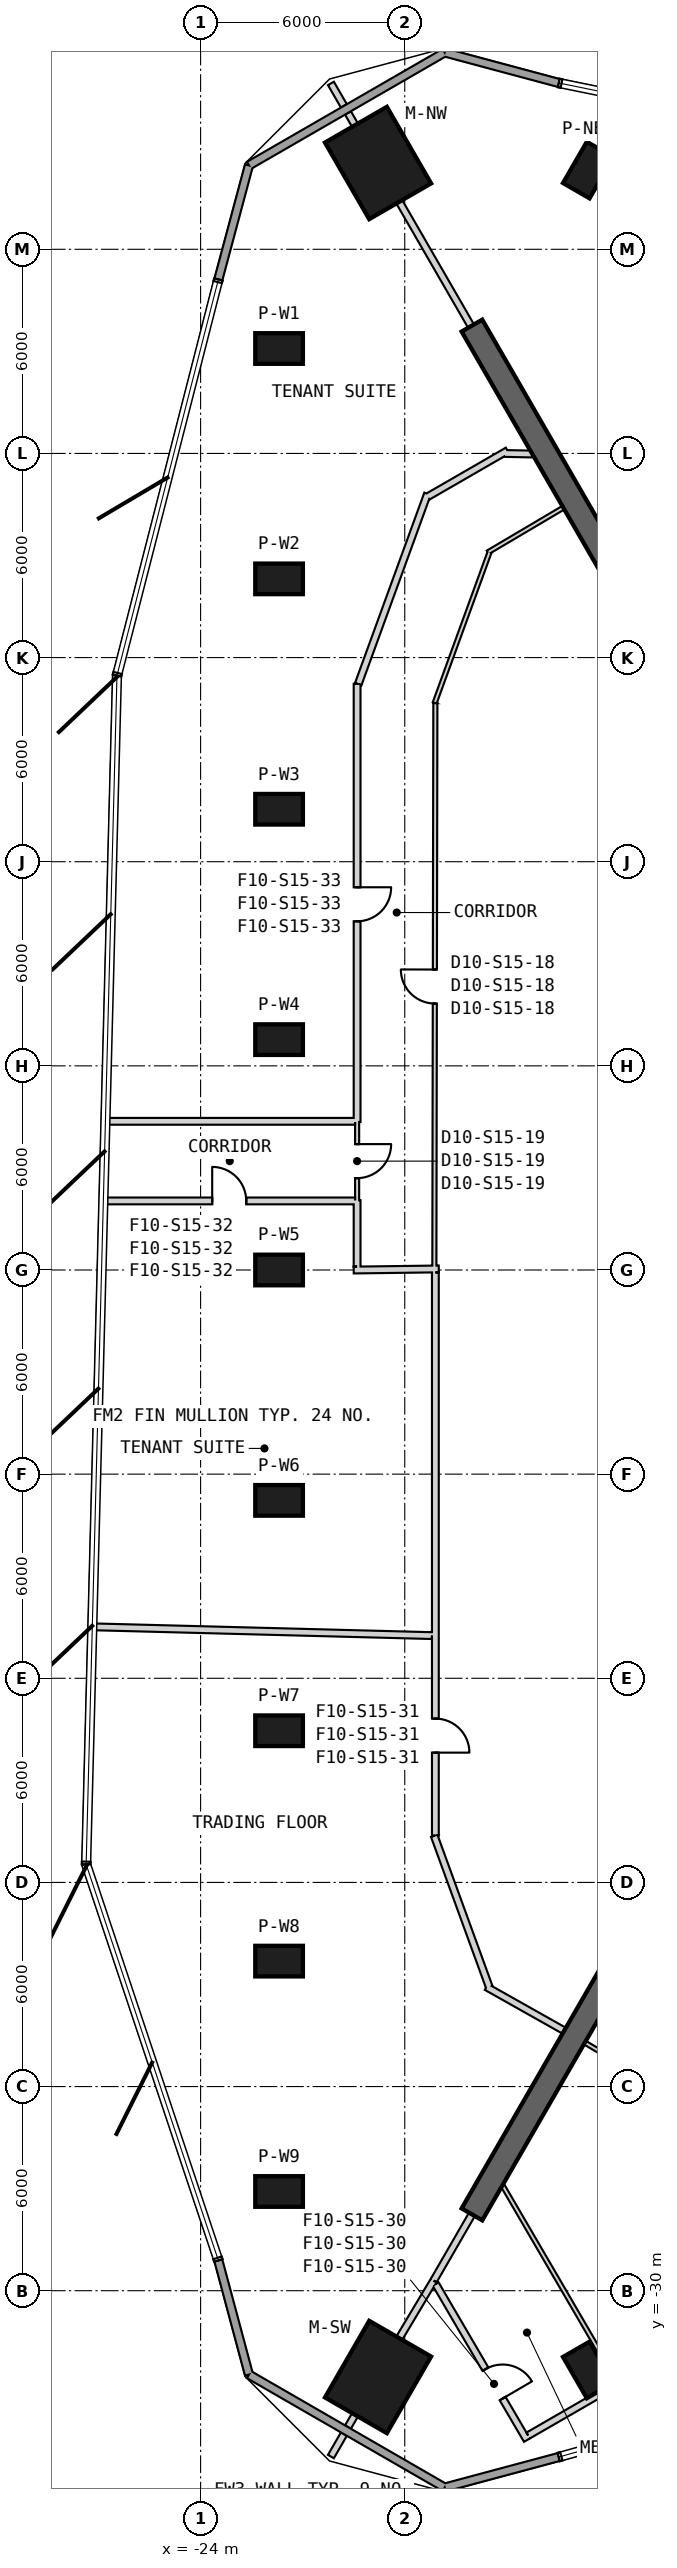
"""IFC4 building model, lengths in metres.
Left out: names, types, materials, properties, quantities, classifications, styles, units other than length and angle.
Written with IfcOpenShell. Run it as: python <this file> out.ifc"""

import sys

from ifc_helpers import new_model, si_unit, direction, frame, frame_2d, origin, origin_2d, place, context, subcontext, project, spatial, rectangle, extrude, element, fill, save


model = new_model("IFC4")
c1 = context("Model", 3, precision=1e-05, world=origin(), true_north=direction((0.0, 1.0)))
c2 = subcontext(c1, "Body", "Model", "MODEL_VIEW")
j1 = project(units=[si_unit("LENGTHUNIT", "METRE"), si_unit("PLANEANGLEUNIT", "RADIAN")], contexts=[c1])
p1 = place(None, origin())
s1 = spatial("IfcSite", under=j1, at=p1, CompositionType="ELEMENT")
p2 = place(p1, origin())
s2 = spatial("IfcBuilding", under=s1, at=p2, CompositionType="ELEMENT")
p3 = place(p2, frame((0.0, 0.0, 241.2)))
s3 = spatial("IfcBuildingStorey", under=s2, at=p3, CompositionType="ELEMENT", Elevation=241.2)
for number, where, z_axis, x_axis in (
    (1, (-18.785, 32.536, 0.0), (0.0, 0.0, 1.0), (-0.5, 0.866, 0.0)),
    (2, (-18.785, -32.536, 0.0), (0.0, 0.0, 1.0), (-0.5, -0.866, 0.0)),
):
    element("IfcColumn", number, at=place(p3, frame(where, z_axis=z_axis, x_axis=x_axis)), inside=s3, PredefinedType="COLUMN", context=c2, shape_type="SweptSolid", body=[
        extrude(rectangle(XDim=2.6, YDim=2.1, at=origin_2d()), origin(), (0.0, 0.0, 1.0), 4.0),
    ])
for number, where, z_axis, x_axis in (
    (3, (-21.693, 27.084, 0.0), (0.0, 0.0, 1.0), (-1.0, 0.0, 0.0)),
    (4, (-21.693, 20.313, 0.0), (0.0, 0.0, 1.0), (-1.0, 0.0, 0.0)),
    (5, (-21.693, 13.542, 0.0), (0.0, 0.0, 1.0), (-1.0, 0.0, 0.0)),
    (6, (-21.693, 6.771, 0.0), (0.0, 0.0, 1.0), (-1.0, 0.0, 0.0)),
    (7, (-21.693, 0.0, 0.0), (0.0, 0.0, 1.0), (-1.0, 0.0, 0.0)),
    (8, (-21.693, -6.771, 0.0), (0.0, 0.0, 1.0), (-1.0, 0.0, 0.0)),
    (9, (-21.693, -13.542, 0.0), (0.0, 0.0, 1.0), (-1.0, 0.0, 0.0)),
    (10, (-21.693, -20.313, 0.0), (0.0, 0.0, 1.0), (-1.0, 0.0, 0.0)),
    (11, (-21.693, -27.084, 0.0), (0.0, 0.0, 1.0), (-1.0, 0.0, 0.0)),
    (12, (-12.609, 32.329, 0.0), (0.0, 0.0, 1.0), (0.5, 0.866, 0.0)),
    (13, (-12.609, -32.329, 0.0), (0.0, 0.0, 1.0), (0.5, -0.866, 0.0)),
):
    element("IfcColumn", number, at=place(p3, frame(where, z_axis=z_axis, x_axis=x_axis)), inside=s3, PredefinedType="COLUMN", context=c2, shape_type="SweptSolid", body=[
        extrude(rectangle(XDim=1.4, YDim=0.9, at=origin_2d()), origin(), (0.0, 0.0, 1.0), 4.0),
    ])
for number, where, z_axis, x_axis in (
    (14, (-10.575, 18.316, 0.0), (0.0, 0.0, 1.0), (-0.5, 0.866, 0.0)),
    (15, (-10.575, -18.316, 0.0), (0.0, 0.0, 1.0), (-0.5, -0.866, 0.0)),
):
    element("IfcWall", number, at=place(p3, frame(where, z_axis=z_axis, x_axis=x_axis)), inside=s3, PredefinedType="SHEAR", context=c2, shape_type="SweptSolid", body=[
        extrude(rectangle(XDim=10.9, YDim=0.7, at=frame_2d((5.45, 0.0))), origin(), (0.0, 0.0, 1.0), 4.0),
    ])
p4 = place(p3, frame((-13.471, 34.888, 0.0), z_axis=(0.0, 0.0, 1.0), x_axis=(-0.965929859648, 0.258803991931, 0.0)))
e16 = element("IfcWall", 16, at=p4, inside=s3, PredefinedType="SOLIDWALL", context=c2, shape_type="SweptSolid", body=[
    extrude(rectangle(XDim=3.474, YDim=0.24, at=frame_2d((1.737, 0.0))), origin(), (0.0, 0.0, 1.0), 3.7),
])
p5 = place(p3, frame((-16.827, 35.787, 0.0), z_axis=(0.0, 0.0, 1.0), x_axis=(-0.866017876419, -0.500013037552, 0.0)))
e17 = element("IfcWall", 17, at=p5, inside=s3, PredefinedType="SOLIDWALL", context=c2, shape_type="SweptSolid", body=[
    extrude(rectangle(XDim=6.642, YDim=0.24, at=frame_2d((3.321, 0.0))), origin(), (0.0, 0.0, 1.0), 3.7),
])
p6 = place(p3, frame((-22.579, 32.466, 0.0), z_axis=(0.0, 0.0, 1.0), x_axis=(-0.25885800589, -0.965915385935, 0.0)))
e18 = element("IfcWall", 18, at=p6, inside=s3, PredefinedType="SOLIDWALL", context=c2, shape_type="SweptSolid", body=[
    extrude(rectangle(XDim=3.47, YDim=0.24, at=frame_2d((1.735, 0.0))), origin(), (0.0, 0.0, 1.0), 3.7),
])
p7 = place(p3, frame((-23.478, -29.11, 0.0), z_axis=(0.0, 0.0, 1.0), x_axis=(0.258821559604, -0.965925152527, 0.0)))
e19 = element("IfcWall", 19, at=p7, inside=s3, PredefinedType="SOLIDWALL", context=c2, shape_type="SweptSolid", body=[
    extrude(rectangle(XDim=3.474, YDim=0.24, at=frame_2d((1.737, 0.0))), origin(), (0.0, 0.0, 1.0), 3.7),
])
p8 = place(p3, frame((-22.579, -32.466, 0.0), z_axis=(0.0, 0.0, 1.0), x_axis=(0.866017876419, -0.500013037552, 0.0)))
e20 = element("IfcWall", 20, at=p8, inside=s3, PredefinedType="SOLIDWALL", context=c2, shape_type="SweptSolid", body=[
    extrude(rectangle(XDim=6.642, YDim=0.24, at=frame_2d((3.321, 0.0))), origin(), (0.0, 0.0, 1.0), 3.7),
])
p9 = place(p3, frame((-16.827, -35.787, 0.0), z_axis=(0.0, 0.0, 1.0), x_axis=(0.96593768865, 0.258774770111, 0.0)))
e21 = element("IfcWall", 21, at=p9, inside=s3, PredefinedType="SOLIDWALL", context=c2, shape_type="SweptSolid", body=[
    extrude(rectangle(XDim=3.47, YDim=0.24, at=frame_2d((1.735, 0.0))), origin(), (0.0, 0.0, 1.0), 3.7),
])
p10 = place(p3, frame((-13.339, 22.405, 0.0), z_axis=(0.0, 0.0, 1.0), x_axis=(-0.86070028932, -0.509111983718, 0.0)))
e22 = element("IfcWall", 22, at=p10, inside=s3, PredefinedType="PARTITIONING", context=c2, shape_type="SweptSolid", body=[
    extrude(rectangle(XDim=2.579, YDim=0.12, at=frame_2d((1.29, 0.0))), origin(), (0.0, 0.0, 1.0), 3.7),
])
p11 = place(p3, frame((-15.506, 21.103, 0.0), z_axis=(0.0, 0.0, 1.0), x_axis=(-0.342017079535, -0.939693735909, 0.0)))
e23 = element("IfcWall", 23, at=p11, inside=s3, PredefinedType="PARTITIONING", context=c2, shape_type="SweptSolid", body=[
    extrude(rectangle(XDim=4.721, YDim=0.12, at=frame_2d((2.361, 0.0))), origin(), (0.0, 0.0, 1.0), 2.88),
])
p12 = place(p3, frame((-17.13, 0.0, 0.0), z_axis=(0.0, 0.0, 1.0), x_axis=(0.001787542932, 0.999998402344, 0.0)))
e24 = element("IfcWall", 24, at=p12, inside=s3, PredefinedType="PARTITIONING", context=c2, shape_type="SweptSolid", body=[
    extrude(rectangle(XDim=16.663, YDim=0.12, at=frame_2d((8.331, 0.0))), origin(), (0.0, 0.0, 1.0), 2.98),
])
p13 = place(p12, frame((7.831, 0.0, 0.0)))
e25 = element("IfcOpeningElement", 25, at=p13, cuts=e24, PredefinedType="OPENING", context=c2, shape_type="SweptSolid", body=[
    extrude(rectangle(XDim=1.0, YDim=2.1, at=frame_2d((0.5, 1.05))), frame((0.0, 0.07, 0.0), z_axis=(0.0, -1.0, 0.0), x_axis=(1.0, 0.0, 0.0)), (0.0, 0.0, 1.0), 0.14),
])
p14 = place(p3, frame((-19.4, 4.35, 0.0), z_axis=(0.0, 0.0, 1.0), x_axis=(0.0, -1.0, 0.0)))
e26 = element("IfcWall", 26, at=p14, inside=s3, PredefinedType="PARTITIONING", context=c2, shape_type="SweptSolid", body=[
    extrude(rectangle(XDim=2.3, YDim=0.12, at=frame_2d((1.15, 0.0))), origin(), (0.0, 0.0, 1.0), 3.7),
])
p15 = place(p14, frame((0.65, 0.0, 0.0)))
e27 = element("IfcOpeningElement", 27, at=p15, cuts=e26, PredefinedType="OPENING", context=c2, shape_type="SweptSolid", body=[
    extrude(rectangle(XDim=1.0, YDim=2.1, at=frame_2d((0.5, 1.05))), frame((0.0, 0.07, 0.0), z_axis=(0.0, -1.0, 0.0), x_axis=(1.0, 0.0, 0.0)), (0.0, 0.0, 1.0), 0.14),
])
p16 = place(p3, frame((-19.5, -0.001, 0.0), z_axis=(0.0, 0.0, 1.0), x_axis=(0.999915662945, 0.012987185857, 0.0)))
e28 = element("IfcWall", 28, at=p16, inside=s3, PredefinedType="PARTITIONING", context=c2, shape_type="SweptSolid", body=[
    extrude(rectangle(XDim=2.5, YDim=0.2, at=frame_2d((1.25, 0.0))), origin(), (0.0, 0.0, 1.0), 3.07),
])
p17 = place(p3, frame((-19.4, 17.228, 0.0), z_axis=(0.0, 0.0, 1.0), x_axis=(0.0, -1.0, 0.0)))
e29 = element("IfcWall", 29, at=p17, inside=s3, PredefinedType="PARTITIONING", context=c2, shape_type="SweptSolid", body=[
    extrude(rectangle(XDim=12.878, YDim=0.2, at=frame_2d((6.439, 0.0))), origin(), (0.0, 0.0, 1.0), 2.98),
])
p18 = place(p17, frame((5.979, 0.0, 0.0)))
e30 = element("IfcOpeningElement", 30, at=p18, cuts=e29, PredefinedType="OPENING", context=c2, shape_type="SweptSolid", body=[
    extrude(rectangle(XDim=1.0, YDim=2.1, at=frame_2d((0.5, 1.05))), frame((0.0, 0.11, 0.0), z_axis=(0.0, -1.0, 0.0), x_axis=(1.0, 0.0, 0.0)), (0.0, 0.0, 1.0), 0.22),
])
p19 = place(p3, frame((-19.4, 2.05, 0.0), z_axis=(0.0, 0.0, 1.0), x_axis=(0.0, -1.0, 0.0)))
e31 = element("IfcWall", 31, at=p19, inside=s3, PredefinedType="PARTITIONING", context=c2, shape_type="SweptSolid", body=[
    extrude(rectangle(XDim=1.95, YDim=0.2, at=frame_2d((0.975, 0.0))), origin(), (0.0, 0.0, 1.0), 3.07),
])
p20 = place(p3, frame((-17.331, 22.814, 0.0), z_axis=(0.0, 0.0, 1.0), x_axis=(-0.342006584993, -0.939697555505, 0.0)))
e32 = element("IfcWall", 32, at=p20, inside=s3, PredefinedType="PARTITIONING", context=c2, shape_type="SweptSolid", body=[
    extrude(rectangle(XDim=5.951, YDim=0.2, at=frame_2d((2.975, 0.0))), origin(), (0.0, 0.0, 1.0), 2.88),
])
p21 = place(p3, frame((-14.98, 24.083, 0.0), z_axis=(0.0, 0.0, 1.0), x_axis=(-0.866008795918, -0.500028764566, 0.0)))
e33 = element("IfcWall", 33, at=p21, inside=s3, PredefinedType="PARTITIONING", context=c2, shape_type="SweptSolid", body=[
    extrude(rectangle(XDim=2.714, YDim=0.2, at=frame_2d((1.357, 0.0))), origin(), (0.0, 0.0, 1.0), 3.7),
])
p22 = place(p3, frame((-14.25, 23.982, 0.0), z_axis=(0.0, 0.0, 1.0), x_axis=(-0.999799129767, 0.02004245786, 0.0)))
e34 = element("IfcWall", 34, at=p22, inside=s3, PredefinedType="PARTITIONING", context=c2, shape_type="SweptSolid", body=[
    extrude(rectangle(XDim=0.841, YDim=0.2, at=frame_2d((0.42, 0.0))), origin(), (0.0, 0.0, 1.0), 3.7),
])
p23 = place(p3, frame((-15.598, -21.072, 0.0), z_axis=(0.0, 0.0, 1.0), x_axis=(0.871234731294, -0.490866624438, 0.0)))
e35 = element("IfcWall", 35, at=p23, inside=s3, PredefinedType="PARTITIONING", context=c2, shape_type="SweptSolid", body=[
    extrude(rectangle(XDim=2.623, YDim=0.2, at=frame_2d((1.311, 0.0))), origin(), (0.0, 0.0, 1.0), 3.7),
])
p24 = place(p3, frame((-17.134, -16.629, 0.0), z_axis=(0.0, 0.0, 1.0), x_axis=(0.342036655594, -0.939686610647, 0.0)))
e36 = element("IfcWall", 36, at=p24, inside=s3, PredefinedType="PARTITIONING", context=c2, shape_type="SweptSolid", body=[
    extrude(rectangle(XDim=4.74, YDim=0.2, at=frame_2d((2.37, 0.0))), origin(), (0.0, 0.0, 1.0), 2.88),
])
p25 = place(p3, frame((-17.1, -0.07, 0.0), z_axis=(0.0, 0.0, 1.0), x_axis=(0.0, -1.0, 0.0)))
e37 = element("IfcWall", 37, at=p25, inside=s3, PredefinedType="PARTITIONING", context=c2, shape_type="SweptSolid", body=[
    extrude(rectangle(XDim=16.552, YDim=0.2, at=frame_2d((8.276, 0.0))), origin(), (0.0, 0.0, 1.0), 2.98),
])
p26 = place(p25, frame((13.115, 0.0, 0.0)))
e38 = element("IfcOpeningElement", 38, at=p26, cuts=e37, PredefinedType="OPENING", context=c2, shape_type="SweptSolid", body=[
    extrude(rectangle(XDim=1.0, YDim=2.1, at=frame_2d((0.5, 1.05))), frame((0.0, 0.11, 0.0), z_axis=(0.0, -1.0, 0.0), x_axis=(1.0, 0.0, 0.0)), (0.0, 0.0, 1.0), 0.22),
])
p27 = place(p3, frame((-12.707, -22.709, 0.0), z_axis=(0.0, 0.0, 1.0), x_axis=(0.860742216303, -0.509041095663, 0.0)))
e39 = element("IfcWall", 39, at=p27, inside=s3, PredefinedType="PARTITIONING", context=c2, shape_type="SweptSolid", body=[
    extrude(rectangle(XDim=2.506, YDim=0.12, at=frame_2d((1.253, 0.0))), origin(), (0.0, 0.0, 1.0), 3.7),
])
p28 = place(p27, frame((0.803, 0.0, 0.0)))
e40 = element("IfcOpeningElement", 40, at=p28, cuts=e39, PredefinedType="OPENING", context=c2, shape_type="SweptSolid", body=[
    extrude(rectangle(XDim=1.0, YDim=2.1, at=frame_2d((0.5, 1.05))), frame((0.0, 0.07, 0.0), z_axis=(0.0, -1.0, 0.0), x_axis=(1.0, 0.0, 0.0)), (0.0, 0.0, 1.0), 0.14),
])
p29 = place(p3, frame((-26.858, 2.03, 0.0), z_axis=(0.0, 0.0, 1.0), x_axis=(1.0, 0.0, 0.0)))
e41 = element("IfcWall", 41, at=p29, inside=s3, PredefinedType="PARTITIONING", context=c2, shape_type="SweptSolid", body=[
    extrude(rectangle(XDim=7.398, YDim=0.2, at=frame_2d((3.699, 0.0))), origin(), (0.0, 0.0, 1.0), 3.7),
])
p30 = place(p29, frame((3.199, 0.0, 0.0)))
e42 = element("IfcOpeningElement", 42, at=p30, cuts=e41, PredefinedType="OPENING", context=c2, shape_type="SweptSolid", body=[
    extrude(rectangle(XDim=1.0, YDim=2.1, at=frame_2d((0.5, 1.05))), frame((0.0, 0.11, 0.0), z_axis=(0.0, -1.0, 0.0), x_axis=(1.0, 0.0, 0.0)), (0.0, 0.0, 1.0), 0.22),
])
p31 = place(p3, frame((-19.46, 4.37, 0.0), z_axis=(0.0, 0.0, 1.0), x_axis=(-1.0, 0.0, 0.0)))
e43 = element("IfcWall", 43, at=p31, inside=s3, PredefinedType="PARTITIONING", context=c2, shape_type="SweptSolid", body=[
    extrude(rectangle(XDim=7.337, YDim=0.2, at=frame_2d((3.669, 0.0))), origin(), (0.0, 0.0, 1.0), 3.7),
])
p32 = place(p3, frame((-17.2, -10.746, 0.0), z_axis=(0.0, 0.0, 1.0), x_axis=(-0.9996635128, 0.025939567783, 0.0)))
e44 = element("IfcWall", 44, at=p32, inside=s3, PredefinedType="PARTITIONING", context=c2, shape_type="SweptSolid", body=[
    extrude(rectangle(XDim=9.986, YDim=0.2, at=frame_2d((4.993, 0.0))), origin(), (0.0, 0.0, 1.0), 2.98),
])
p33 = place(p3, frame((-20.17, -34.875, 0.0), z_axis=(0.0, 0.0, 1.0), x_axis=(0.499999897272, 0.866025463095, 0.0)))
e45 = element("IfcWall", 45, at=p33, inside=s3, PredefinedType="PARTITIONING", context=c2, shape_type="SweptSolid", body=[
    extrude(rectangle(XDim=0.762, YDim=0.2, at=frame_2d((0.381, 0.0))), origin(), (0.0, 0.0, 1.0), 3.7),
])
p34 = place(p3, frame((-19.669, -34.007, 0.0), z_axis=(0.0, 0.0, 1.0), x_axis=(0.499739399214, 0.866175809448, 0.0)))
e46 = element("IfcWall", 46, at=p34, inside=s3, PredefinedType="PARTITIONING", context=c2, shape_type="SweptSolid", body=[
    extrude(rectangle(XDim=0.416, YDim=0.2, at=frame_2d((0.208, 0.0))), origin(), (0.0, 0.0, 1.0), 3.7),
])
p35 = place(p3, frame((-17.149, -29.702, 0.0), z_axis=(0.0, 0.0, 1.0), x_axis=(0.500042241774, 0.866001014111, 0.0)))
e47 = element("IfcWall", 47, at=p35, inside=s3, PredefinedType="PARTITIONING", context=c2, shape_type="SweptSolid", body=[
    extrude(rectangle(XDim=2.247, YDim=0.2, at=frame_2d((1.124, 0.0))), origin(), (0.0, 0.0, 1.0), 3.27),
])
p36 = place(p3, frame((-18.161, -31.396, 0.0), z_axis=(0.0, 0.0, 1.0), x_axis=(0.512692976909, 0.858572018778, 0.0)))
e48 = element("IfcWall", 48, at=p36, inside=s3, PredefinedType="PARTITIONING", context=c2, shape_type="SweptSolid", body=[
    extrude(rectangle(XDim=1.973, YDim=0.2, at=frame_2d((0.986, 0.0))), origin(), (0.0, 0.0, 1.0), 3.27),
])
p37 = place(p3, frame((-20.17, 34.875, 0.0), z_axis=(0.0, 0.0, 1.0), x_axis=(0.499999897272, -0.866025463095, 0.0)))
e49 = element("IfcWall", 49, at=p37, inside=s3, PredefinedType="PARTITIONING", context=c2, shape_type="SweptSolid", body=[
    extrude(rectangle(XDim=0.762, YDim=0.2, at=frame_2d((0.381, 0.0))), origin(), (0.0, 0.0, 1.0), 3.7),
])
p38 = place(p3, frame((-19.669, 34.007, 0.0), z_axis=(0.0, 0.0, 1.0), x_axis=(0.499739399214, -0.866175809448, 0.0)))
e50 = element("IfcWall", 50, at=p38, inside=s3, PredefinedType="PARTITIONING", context=c2, shape_type="SweptSolid", body=[
    extrude(rectangle(XDim=0.416, YDim=0.2, at=frame_2d((0.208, 0.0))), origin(), (0.0, 0.0, 1.0), 3.7),
])
p39 = place(p3, frame((-18.161, 31.396, 0.0), z_axis=(0.0, 0.0, 1.0), x_axis=(0.500034652011, -0.866005396512, 0.0)))
e51 = element("IfcWall", 51, at=p39, inside=s3, PredefinedType="PARTITIONING", context=c2, shape_type="SweptSolid", body=[
    extrude(rectangle(XDim=4.219, YDim=0.2, at=frame_2d((2.11, 0.0))), origin(), (0.0, 0.0, 1.0), 3.27),
])
p40 = place(p3, frame((-11.729, -32.729, 0.0), z_axis=(0.0, 0.0, 1.0), x_axis=(-0.866009774538, -0.500027069672, 0.0)))
e52 = element("IfcWall", 52, at=p40, inside=s3, PredefinedType="PARTITIONING", context=c2, shape_type="SweptSolid", body=[
    extrude(rectangle(XDim=3.052, YDim=0.2, at=frame_2d((1.526, 0.0))), origin(), (0.0, 0.0, 1.0), 3.7),
])
p41 = place(p3, frame((-17.093, -29.803, 0.0), z_axis=(0.0, 0.0, 1.0), x_axis=(0.504838763147, -0.863213660239, 0.0)))
e53 = element("IfcWall", 53, at=p41, inside=s3, PredefinedType="PARTITIONING", context=c2, shape_type="SweptSolid", body=[
    extrude(rectangle(XDim=5.316, YDim=0.2, at=frame_2d((2.658, 0.0))), origin(), (0.0, 0.0, 1.0), 3.27),
])
p42 = place(p41, frame((2.9, 0.0, 0.0)))
e54 = element("IfcOpeningElement", 54, at=p42, cuts=e53, PredefinedType="OPENING", context=c2, shape_type="SweptSolid", body=[
    extrude(rectangle(XDim=1.0, YDim=2.1, at=frame_2d((0.5, 1.05))), frame((0.0, 0.11, 0.0), z_axis=(0.0, -1.0, 0.0), x_axis=(1.0, 0.0, 0.0)), (0.0, 0.0, 1.0), 0.22),
])
p43 = place(p3, frame((-15.128, -26.902, 0.0), z_axis=(0.0, 0.0, 1.0), x_axis=(0.503743114679, -0.863853502866, 0.0)))
e55 = element("IfcWall", 55, at=p43, inside=s3, PredefinedType="PARTITIONING", context=c2, shape_type="SweptSolid", body=[
    extrude(rectangle(XDim=6.646, YDim=0.12, at=frame_2d((3.323, 0.0))), origin(), (0.0, 0.0, 1.0), 2.88),
])
p44 = place(p13, origin())
e56 = element("IfcDoor", 56, at=p44, inside=s3, OperationType="SINGLE_SWING_RIGHT", PredefinedType="NOTDEFINED", context=c2, shape_type="SweptSolid", body=[
    extrude(rectangle(XDim=1.0, YDim=2.1, at=frame_2d((0.5, 1.05))), frame((0.0, 0.025, 0.0), z_axis=(0.0, -1.0, 0.0), x_axis=(1.0, 0.0, 0.0)), (0.0, 0.0, 1.0), 0.05),
])
fill(e25, e56)
p45 = place(p15, origin())
e57 = element("IfcDoor", 57, at=p45, inside=s3, OperationType="SINGLE_SWING_LEFT", PredefinedType="NOTDEFINED", context=c2, shape_type="SweptSolid", body=[
    extrude(rectangle(XDim=1.0, YDim=2.1, at=frame_2d((0.5, 1.05))), frame((0.0, 0.025, 0.0), z_axis=(0.0, -1.0, 0.0), x_axis=(1.0, 0.0, 0.0)), (0.0, 0.0, 1.0), 0.05),
])
fill(e27, e57)
p46 = place(p42, origin())
e58 = element("IfcDoor", 58, at=p46, inside=s3, OperationType="SINGLE_SWING_LEFT", PredefinedType="USERDEFINED", context=c2, shape_type="SweptSolid", body=[
    extrude(rectangle(XDim=1.0, YDim=2.1, at=frame_2d((0.5, 1.05))), frame((0.0, 0.025, 0.0), z_axis=(0.0, -1.0, 0.0), x_axis=(1.0, 0.0, 0.0)), (0.0, 0.0, 1.0), 0.05),
])
fill(e54, e58)
p47 = place(p26, origin())
e59 = element("IfcDoor", 59, at=p47, inside=s3, OperationType="SINGLE_SWING_RIGHT", PredefinedType="USERDEFINED", context=c2, shape_type="SweptSolid", body=[
    extrude(rectangle(XDim=1.0, YDim=2.1, at=frame_2d((0.5, 1.05))), frame((0.0, 0.025, 0.0), z_axis=(0.0, -1.0, 0.0), x_axis=(1.0, 0.0, 0.0)), (0.0, 0.0, 1.0), 0.05),
])
fill(e38, e59)
p48 = place(p30, origin())
e60 = element("IfcDoor", 60, at=p48, inside=s3, OperationType="SINGLE_SWING_LEFT", PredefinedType="USERDEFINED", context=c2, shape_type="SweptSolid", body=[
    extrude(rectangle(XDim=1.0, YDim=2.1, at=frame_2d((0.5, 1.05))), frame((0.0, 0.025, 0.0), z_axis=(0.0, -1.0, 0.0), x_axis=(1.0, 0.0, 0.0)), (0.0, 0.0, 1.0), 0.05),
])
fill(e42, e60)
p49 = place(p18, origin())
e61 = element("IfcDoor", 61, at=p49, inside=s3, OperationType="SINGLE_SWING_RIGHT", PredefinedType="USERDEFINED", context=c2, shape_type="SweptSolid", body=[
    extrude(rectangle(XDim=1.0, YDim=2.1, at=frame_2d((0.5, 1.05))), frame((0.0, 0.025, 0.0), z_axis=(0.0, -1.0, 0.0), x_axis=(1.0, 0.0, 0.0)), (0.0, 0.0, 1.0), 0.05),
])
fill(e30, e61)
save(model, sys.argv[1])
